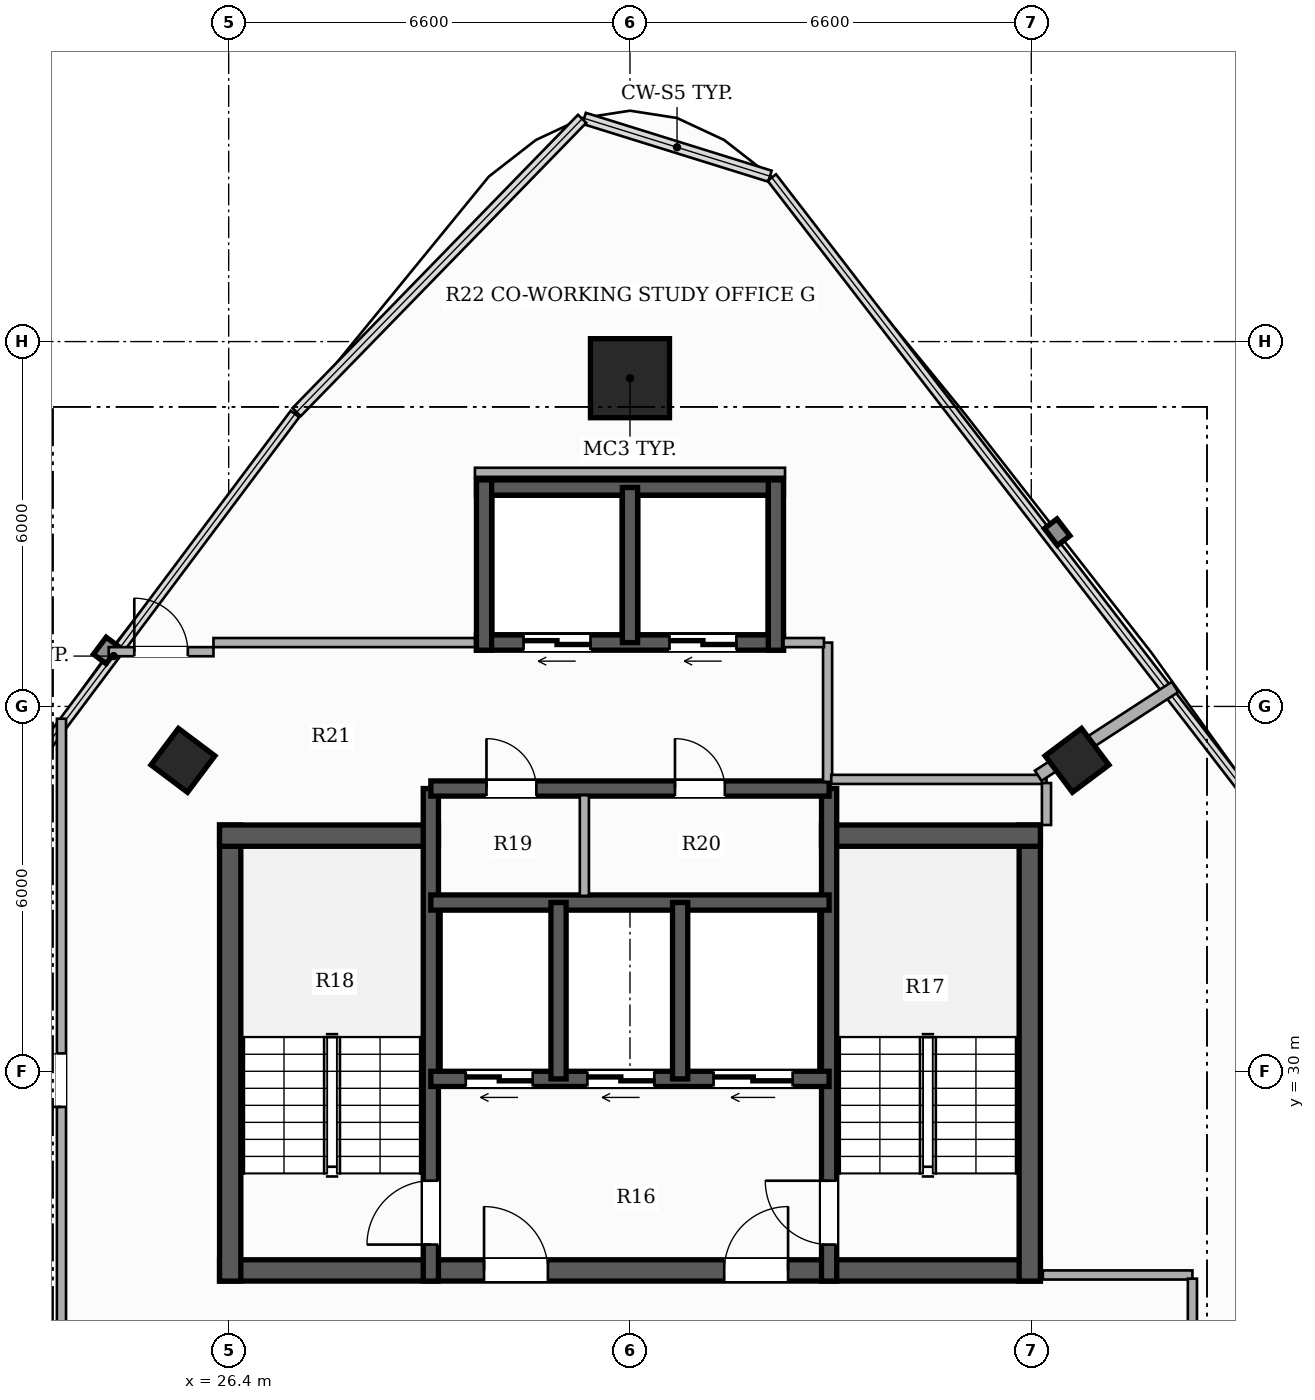
"""IFC4 building model, lengths in metres.
Left out: names, types, materials, properties, quantities, classifications, styles, units other than length and angle.
Written with IfcOpenShell. Run it as: python <this file> out.ifc"""

import sys

from ifc_helpers import new_model, si_unit, direction, frame, frame_2d, origin, origin_2d, place, context, subcontext, project, spatial, rectangle, hollow_rectangle, extrude, element, fill, save


model = new_model("IFC4")
c1 = context("Model", 3, precision=1e-05, world=origin(), true_north=direction((0.0, 1.0)))
c2 = subcontext(c1, "Body", "Model", "MODEL_VIEW")
j1 = project(units=[si_unit("LENGTHUNIT", "METRE"), si_unit("PLANEANGLEUNIT", "RADIAN")], contexts=[c1])
p1 = place(None, origin())
s1 = spatial("IfcSite", under=j1, at=p1, CompositionType="ELEMENT")
p2 = place(p1, origin())
s2 = spatial("IfcBuilding", under=s1, at=p2, CompositionType="ELEMENT")
p3 = place(p2, frame((0.0, 0.0, 232.7)))
s3 = spatial("IfcBuildingStorey", under=s2, at=p3, CompositionType="ELEMENT", Elevation=232.7)
p4 = place(p3, frame((26.25, 26.725, 0.0), z_axis=(0.0, 0.0, 1.0), x_axis=(1.0, 0.0, 0.0)))
e1 = element("IfcWall", 1, at=p4, inside=s3, PredefinedType="SHEAR", context=c2, shape_type="SweptSolid", body=[
    extrude(rectangle(XDim=13.5, YDim=0.35, at=frame_2d((6.75, 0.0))), origin(), (0.0, 0.0, 1.0), 3.3),
])
p5 = place(p4, frame((4.35, 0.0, 0.0)))
e2 = element("IfcOpeningElement", 2, at=p5, cuts=e1, PredefinedType="OPENING", context=c2, shape_type="SweptSolid", body=[
    extrude(rectangle(XDim=1.05, YDim=2.15, at=frame_2d((0.525, 1.075))), frame((0.0, 0.185, 0.0), z_axis=(0.0, -1.0, 0.0), x_axis=(1.0, 0.0, 0.0)), (0.0, 0.0, 1.0), 0.37),
])
p6 = place(p4, frame((8.3, 0.0, 0.0)))
e3 = element("IfcOpeningElement", 3, at=p6, cuts=e1, PredefinedType="OPENING", context=c2, shape_type="SweptSolid", body=[
    extrude(rectangle(XDim=1.05, YDim=2.15, at=frame_2d((0.525, 1.075))), frame((0.0, 0.185, 0.0), z_axis=(0.0, -1.0, 0.0), x_axis=(1.0, 0.0, 0.0)), (0.0, 0.0, 1.0), 0.37),
])
p7 = place(p3, frame((26.425, 26.55, 0.0), z_axis=(0.0, 0.0, 1.0), x_axis=(0.0, 1.0, 0.0)))
e4 = element("IfcWall", 4, at=p7, inside=s3, PredefinedType="SHEAR", context=c2, shape_type="SweptSolid", body=[
    extrude(rectangle(XDim=7.5, YDim=0.35, at=frame_2d((3.75, 0.0))), origin(), (0.0, 0.0, 1.0), 3.3),
])
p8 = place(p3, frame((26.25, 33.875, 0.0), z_axis=(0.0, 0.0, 1.0), x_axis=(1.0, 0.0, 0.0)))
e5 = element("IfcWall", 5, at=p8, inside=s3, PredefinedType="SHEAR", context=c2, shape_type="SweptSolid", body=[
    extrude(rectangle(XDim=3.6, YDim=0.35, at=frame_2d((1.8, 0.0))), origin(), (0.0, 0.0, 1.0), 3.3),
])
p9 = place(p3, frame((39.575, 26.55, 0.0), z_axis=(0.0, 0.0, 1.0), x_axis=(0.0, 1.0, 0.0)))
e6 = element("IfcWall", 6, at=p9, inside=s3, PredefinedType="SHEAR", context=c2, shape_type="SweptSolid", body=[
    extrude(rectangle(XDim=7.5, YDim=0.35, at=frame_2d((3.75, 0.0))), origin(), (0.0, 0.0, 1.0), 3.3),
])
p10 = place(p3, frame((36.15, 33.875, 0.0), z_axis=(0.0, 0.0, 1.0), x_axis=(1.0, 0.0, 0.0)))
e7 = element("IfcWall", 7, at=p10, inside=s3, PredefinedType="SHEAR", context=c2, shape_type="SweptSolid", body=[
    extrude(rectangle(XDim=3.6, YDim=0.35, at=frame_2d((1.8, 0.0))), origin(), (0.0, 0.0, 1.0), 3.3),
])
p11 = place(p3, frame((29.725, 26.55, 0.0), z_axis=(0.0, 0.0, 1.0), x_axis=(0.0, 1.0, 0.0)))
e8 = element("IfcWall", 8, at=p11, inside=s3, PredefinedType="SHEAR", context=c2, shape_type="SweptSolid", body=[
    extrude(rectangle(XDim=8.1, YDim=0.25, at=frame_2d((4.05, 0.0))), origin(), (0.0, 0.0, 1.0), 3.3),
])
p12 = place(p11, frame((0.6, 0.0, 0.0)))
e9 = element("IfcOpeningElement", 9, at=p12, cuts=e8, PredefinedType="OPENING", context=c2, shape_type="SweptSolid", body=[
    extrude(rectangle(XDim=1.05, YDim=2.15, at=frame_2d((0.525, 1.075))), frame((0.0, 0.135, 0.0), z_axis=(0.0, -1.0, 0.0), x_axis=(1.0, 0.0, 0.0)), (0.0, 0.0, 1.0), 0.27),
])
p13 = place(p3, frame((36.275, 26.55, 0.0), z_axis=(0.0, 0.0, 1.0), x_axis=(0.0, 1.0, 0.0)))
e10 = element("IfcWall", 10, at=p13, inside=s3, PredefinedType="SHEAR", context=c2, shape_type="SweptSolid", body=[
    extrude(rectangle(XDim=8.1, YDim=0.25, at=frame_2d((4.05, 0.0))), origin(), (0.0, 0.0, 1.0), 3.3),
])
p14 = place(p13, frame((0.6, 0.0, 0.0)))
e11 = element("IfcOpeningElement", 11, at=p14, cuts=e10, PredefinedType="OPENING", context=c2, shape_type="SweptSolid", body=[
    extrude(rectangle(XDim=1.05, YDim=2.15, at=frame_2d((0.525, 1.075))), frame((0.0, 0.135, 0.0), z_axis=(0.0, -1.0, 0.0), x_axis=(1.0, 0.0, 0.0)), (0.0, 0.0, 1.0), 0.27),
])
p15 = place(p3, frame((36.275, 29.875, 0.0), z_axis=(0.0, 0.0, 1.0), x_axis=(-1.0, 0.0, 0.0)))
e12 = element("IfcWall", 12, at=p15, inside=s3, PredefinedType="SHEAR", context=c2, shape_type="SweptSolid", body=[
    extrude(rectangle(XDim=6.55, YDim=0.25, at=frame_2d((3.275, 0.0))), origin(), (0.0, 0.0, 1.0), 3.3),
])
p16 = place(p15, frame((4.875, 0.0, 0.0)))
e13 = element("IfcOpeningElement", 13, at=p16, cuts=e12, PredefinedType="OPENING", context=c2, shape_type="SweptSolid", body=[
    extrude(rectangle(XDim=1.1, YDim=2.2, at=frame_2d((0.55, 1.1))), frame((0.0, 0.135, 0.0), z_axis=(0.0, -1.0, 0.0), x_axis=(1.0, 0.0, 0.0)), (0.0, 0.0, 1.0), 0.27),
])
p17 = place(p15, frame((2.875, 0.0, 0.0)))
e14 = element("IfcOpeningElement", 14, at=p17, cuts=e12, PredefinedType="OPENING", context=c2, shape_type="SweptSolid", body=[
    extrude(rectangle(XDim=1.1, YDim=2.2, at=frame_2d((0.55, 1.1))), frame((0.0, 0.135, 0.0), z_axis=(0.0, -1.0, 0.0), x_axis=(1.0, 0.0, 0.0)), (0.0, 0.0, 1.0), 0.27),
])
p18 = place(p15, frame((0.6, 0.0, 0.0)))
e15 = element("IfcOpeningElement", 15, at=p18, cuts=e12, PredefinedType="OPENING", context=c2, shape_type="SweptSolid", body=[
    extrude(rectangle(XDim=1.3, YDim=2.2, at=frame_2d((0.65, 1.1))), frame((0.0, 0.135, 0.0), z_axis=(0.0, -1.0, 0.0), x_axis=(1.0, 0.0, 0.0)), (0.0, 0.0, 1.0), 0.27),
])
p19 = place(p3, frame((29.725, 32.775, 0.0), z_axis=(0.0, 0.0, 1.0), x_axis=(1.0, 0.0, 0.0)))
e16 = element("IfcWall", 16, at=p19, inside=s3, PredefinedType="SHEAR", context=c2, shape_type="SweptSolid", body=[
    extrude(rectangle(XDim=6.55, YDim=0.25, at=frame_2d((3.275, 0.0))), origin(), (0.0, 0.0, 1.0), 3.3),
])
for number, where, z_axis, x_axis in (
    (17, (31.825, 29.875, 0.0), (0.0, 0.0, 1.0), (0.0, 1.0, 0.0)),
    (18, (33.825, 29.875, 0.0), (0.0, 0.0, 1.0), (0.0, 1.0, 0.0)),
):
    element("IfcWall", number, at=place(p3, frame(where, z_axis=z_axis, x_axis=x_axis)), inside=s3, PredefinedType="SHEAR", context=c2, shape_type="SweptSolid", body=[
        extrude(rectangle(XDim=2.9, YDim=0.25, at=frame_2d((1.45, 0.0))), origin(), (0.0, 0.0, 1.0), 3.3),
    ])
p20 = place(p3, frame((29.725, 34.65, 0.0), z_axis=(0.0, 0.0, 1.0), x_axis=(1.0, 0.0, 0.0)))
e19 = element("IfcWall", 19, at=p20, inside=s3, PredefinedType="SHEAR", context=c2, shape_type="SweptSolid", body=[
    extrude(rectangle(XDim=6.55, YDim=0.25, at=frame_2d((3.275, 0.0))), origin(), (0.0, 0.0, 1.0), 3.3),
])
p21 = place(p20, frame((0.915, 0.0, 0.0)))
e20 = element("IfcOpeningElement", 20, at=p21, cuts=e19, PredefinedType="OPENING", context=c2, shape_type="SweptSolid", body=[
    extrude(rectangle(XDim=0.82, YDim=2.1, at=frame_2d((0.41, 1.05))), frame((0.0, 0.135, 0.0), z_axis=(0.0, -1.0, 0.0), x_axis=(1.0, 0.0, 0.0)), (0.0, 0.0, 1.0), 0.27),
])
p22 = place(p20, frame((4.015, 0.0, 0.0)))
e21 = element("IfcOpeningElement", 21, at=p22, cuts=e19, PredefinedType="OPENING", context=c2, shape_type="SweptSolid", body=[
    extrude(rectangle(XDim=0.82, YDim=2.1, at=frame_2d((0.41, 1.05))), frame((0.0, 0.135, 0.0), z_axis=(0.0, -1.0, 0.0), x_axis=(1.0, 0.0, 0.0)), (0.0, 0.0, 1.0), 0.27),
])
p23 = place(p3, frame((35.525, 37.05, 0.0), z_axis=(0.0, 0.0, 1.0), x_axis=(-1.0, 0.0, 0.0)))
e22 = element("IfcWall", 22, at=p23, inside=s3, PredefinedType="SHEAR", context=c2, shape_type="SweptSolid", body=[
    extrude(rectangle(XDim=5.05, YDim=0.25, at=frame_2d((2.525, 0.0))), origin(), (0.0, 0.0, 1.0), 3.3),
])
p24 = place(p23, frame((3.175, 0.0, 0.0)))
e23 = element("IfcOpeningElement", 23, at=p24, cuts=e22, PredefinedType="OPENING", context=c2, shape_type="SweptSolid", body=[
    extrude(rectangle(XDim=1.1, YDim=2.2, at=frame_2d((0.55, 1.1))), frame((0.0, 0.135, 0.0), z_axis=(0.0, -1.0, 0.0), x_axis=(1.0, 0.0, 0.0)), (0.0, 0.0, 1.0), 0.27),
])
p25 = place(p23, frame((0.775, 0.0, 0.0)))
e24 = element("IfcOpeningElement", 24, at=p25, cuts=e22, PredefinedType="OPENING", context=c2, shape_type="SweptSolid", body=[
    extrude(rectangle(XDim=1.1, YDim=2.2, at=frame_2d((0.55, 1.1))), frame((0.0, 0.135, 0.0), z_axis=(0.0, -1.0, 0.0), x_axis=(1.0, 0.0, 0.0)), (0.0, 0.0, 1.0), 0.27),
])
p26 = place(p3, frame((30.475, 39.6, 0.0), z_axis=(0.0, 0.0, 1.0), x_axis=(1.0, 0.0, 0.0)))
e25 = element("IfcWall", 25, at=p26, inside=s3, PredefinedType="SHEAR", context=c2, shape_type="SweptSolid", body=[
    extrude(rectangle(XDim=5.05, YDim=0.25, at=frame_2d((2.525, 0.0))), origin(), (0.0, 0.0, 1.0), 3.3),
])
for number, where, z_axis, x_axis in (
    (26, (30.6, 36.925, 0.0), (0.0, 0.0, 1.0), (0.0, 1.0, 0.0)),
    (27, (35.4, 36.925, 0.0), (0.0, 0.0, 1.0), (0.0, 1.0, 0.0)),
):
    element("IfcWall", number, at=place(p3, frame(where, z_axis=z_axis, x_axis=x_axis)), inside=s3, PredefinedType="SHEAR", context=c2, shape_type="SweptSolid", body=[
        extrude(rectangle(XDim=2.8, YDim=0.25, at=frame_2d((1.4, 0.0))), origin(), (0.0, 0.0, 1.0), 3.3),
    ])
p27 = place(p3, frame((33.0, 37.05, 0.0), z_axis=(0.0, 0.0, 1.0), x_axis=(0.0, 1.0, 0.0)))
e28 = element("IfcWall", 28, at=p27, inside=s3, PredefinedType="SHEAR", context=c2, shape_type="SweptSolid", body=[
    extrude(rectangle(XDim=2.55, YDim=0.25, at=frame_2d((1.275, 0.0))), origin(), (0.0, 0.0, 1.0), 3.3),
])
p28 = place(p3, frame((33.0, 41.398, 0.0), z_axis=(0.0, 0.0, 1.0), x_axis=(1.0, 0.0, 0.0)))
e29 = element("IfcColumn", 29, at=p28, inside=s3, PredefinedType="COLUMN", context=c2, shape_type="SweptSolid", body=[
    extrude(hollow_rectangle(XDim=1.3, YDim=1.3, WallThickness=0.04, at=origin_2d()), origin(), (0.0, 0.0, 1.0), 3.3),
])
for number, where, z_axis, x_axis in (
    (30, (25.648, 35.113, 0.0), (0.0, 0.0, 1.0), (0.6, 0.8, 0.0)),
    (31, (40.352, 35.113, 0.0), (0.0, 0.0, 1.0), (-0.6, 0.8, 0.0)),
):
    element("IfcColumn", number, at=place(p3, frame(where, z_axis=z_axis, x_axis=x_axis)), inside=s3, PredefinedType="COLUMN", context=c2, shape_type="SweptSolid", body=[
        extrude(hollow_rectangle(XDim=0.75, YDim=0.75, WallThickness=0.025, at=origin_2d()), origin(), (0.0, 0.0, 1.0), 3.3),
    ])
p29 = place(p3, frame((36.25, 34.76, 0.0), z_axis=(0.0, 0.0, 1.0), x_axis=(0.0, 1.0, 0.0)))
e32 = element("IfcWall", 32, at=p29, inside=s3, PredefinedType="PARTITIONING", context=c2, shape_type="SweptSolid", body=[
    extrude(rectangle(XDim=2.29, YDim=0.15, at=frame_2d((1.145, 0.0))), origin(), (0.0, 0.0, 1.0), 2.385),
])
p30 = place(p3, frame((35.525, 37.05, 0.0), z_axis=(0.0, 0.0, 1.0), x_axis=(1.0, 0.0, 0.0)))
e33 = element("IfcWall", 33, at=p30, inside=s3, PredefinedType="PARTITIONING", context=c2, shape_type="SweptSolid", body=[
    extrude(rectangle(XDim=0.665, YDim=0.15, at=frame_2d((0.333, 0.0))), origin(), (0.0, 0.0, 1.0), 2.385),
])
p31 = place(p3, frame((32.25, 32.885, 0.0), z_axis=(0.0, 0.0, 1.0), x_axis=(0.0, 1.0, 0.0)))
e34 = element("IfcWall", 34, at=p31, inside=s3, PredefinedType="PARTITIONING", context=c2, shape_type="SweptSolid", body=[
    extrude(rectangle(XDim=1.655, YDim=0.15, at=frame_2d((0.828, 0.0))), origin(), (0.0, 0.0, 1.0), 3.02),
])
p32 = place(p3, frame((23.65, 23.91, 0.0), z_axis=(0.0, 0.0, 1.0), x_axis=(0.0, 1.0, 0.0)))
e35 = element("IfcWall", 35, at=p32, inside=s3, PredefinedType="PARTITIONING", context=c2, shape_type="SweptSolid", body=[
    extrude(rectangle(XDim=11.888, YDim=0.15, at=frame_2d((5.944, 0.0))), origin(), (0.0, 0.0, 1.0), 2.452),
])
p33 = place(p32, frame((5.504, 0.0, 0.0)))
e36 = element("IfcOpeningElement", 36, at=p33, cuts=e35, PredefinedType="OPENING", context=c2, shape_type="SweptSolid", body=[
    extrude(rectangle(XDim=0.88, YDim=2.1, at=frame_2d((0.44, 1.05))), frame((0.0, 0.085, 0.0), z_axis=(0.0, -1.0, 0.0), x_axis=(1.0, 0.0, 0.0)), (0.0, 0.0, 1.0), 0.17),
])
p34 = place(p3, frame((24.427, 36.9, 0.0), z_axis=(0.0, 0.0, 1.0), x_axis=(1.0, 0.0, 0.0)))
e37 = element("IfcWall", 37, at=p34, inside=s3, PredefinedType="PARTITIONING", context=c2, shape_type="SweptSolid", body=[
    extrude(rectangle(XDim=1.723, YDim=0.15, at=frame_2d((0.861, 0.0))), origin(), (0.0, 0.0, 1.0), 2.579),
])
p35 = place(p34, frame((0.421, 0.0, 0.0)))
e38 = element("IfcOpeningElement", 38, at=p35, cuts=e37, PredefinedType="OPENING", context=c2, shape_type="SweptSolid", body=[
    extrude(rectangle(XDim=0.88, YDim=2.1, at=frame_2d((0.44, 1.05))), frame((0.0, 0.085, 0.0), z_axis=(0.0, -1.0, 0.0), x_axis=(1.0, 0.0, 0.0)), (0.0, 0.0, 1.0), 0.17),
])
p36 = place(p3, frame((39.79, 26.65, 0.0), z_axis=(0.0, 0.0, 1.0), x_axis=(1.0, 0.0, 0.0)))
e39 = element("IfcWall", 39, at=p36, inside=s3, PredefinedType="PARTITIONING", context=c2, shape_type="SweptSolid", body=[
    extrude(rectangle(XDim=2.46, YDim=0.15, at=frame_2d((1.23, 0.0))), origin(), (0.0, 0.0, 1.0), 2.525),
])
p37 = place(p3, frame((42.25, 26.59, 0.0), z_axis=(0.0, 0.0, 1.0), x_axis=(0.0, -1.0, 0.0)))
e40 = element("IfcWall", 40, at=p37, inside=s3, PredefinedType="PARTITIONING", context=c2, shape_type="SweptSolid", body=[
    extrude(rectangle(XDim=2.74, YDim=0.15, at=frame_2d((1.37, 0.0))), origin(), (0.0, 0.0, 1.0), 2.733),
])
p38 = place(p37, frame((0.91, 0.0, 0.0)))
e41 = element("IfcOpeningElement", 41, at=p38, cuts=e40, PredefinedType="OPENING", context=c2, shape_type="SweptSolid", body=[
    extrude(rectangle(XDim=0.92, YDim=2.15, at=frame_2d((0.46, 1.075))), frame((0.0, 0.085, 0.0), z_axis=(0.0, -1.0, 0.0), x_axis=(1.0, 0.0, 0.0)), (0.0, 0.0, 1.0), 0.17),
])
p39 = place(p3, frame((26.15, 37.05, 0.0), z_axis=(0.0, 0.0, 1.0), x_axis=(1.0, 0.0, 0.0)))
e42 = element("IfcWall", 42, at=p39, inside=s3, PredefinedType="PARTITIONING", context=c2, shape_type="SweptSolid", body=[
    extrude(rectangle(XDim=4.3, YDim=0.15, at=frame_2d((2.15, 0.0))), origin(), (0.0, 0.0, 1.0), 2.385),
])
p40 = place(p3, frame((30.45, 39.85, 0.0), z_axis=(0.0, 0.0, 1.0), x_axis=(1.0, 0.0, 0.0)))
e43 = element("IfcWall", 43, at=p40, inside=s3, PredefinedType="PARTITIONING", context=c2, shape_type="SweptSolid", body=[
    extrude(rectangle(XDim=5.1, YDim=0.15, at=frame_2d((2.55, 0.0))), origin(), (0.0, 0.0, 1.0), 2.452),
])
p41 = place(p3, frame((36.31, 34.8, 0.0), z_axis=(0.0, 0.0, 1.0), x_axis=(1.0, 0.0, 0.0)))
e44 = element("IfcWall", 44, at=p41, inside=s3, PredefinedType="PARTITIONING", context=c2, shape_type="SweptSolid", body=[
    extrude(rectangle(XDim=3.54, YDim=0.15, at=frame_2d((1.77, 0.0))), origin(), (0.0, 0.0, 1.0), 2.385),
])
p42 = place(p3, frame((39.85, 34.74, 0.0), z_axis=(0.0, 0.0, 1.0), x_axis=(0.0, -1.0, 0.0)))
e45 = element("IfcWall", 45, at=p42, inside=s3, PredefinedType="PARTITIONING", context=c2, shape_type="SweptSolid", body=[
    extrude(rectangle(XDim=0.69, YDim=0.15, at=frame_2d((0.345, 0.0))), origin(), (0.0, 0.0, 1.0), 2.733),
])
p43 = place(p3, frame((39.714, 34.86, 0.0), z_axis=(0.0, 0.0, 1.0), x_axis=(0.838740992226, 0.54453057578, 0.0)))
e46 = element("IfcWall", 46, at=p43, inside=s3, PredefinedType="PARTITIONING", context=c2, shape_type="SweptSolid", body=[
    extrude(rectangle(XDim=2.681, YDim=0.2, at=frame_2d((1.341, 0.0))), origin(), (0.0, 0.0, 1.0), 2.452),
])
p44 = place(p12, origin())
e47 = element("IfcDoor", 47, at=p44, inside=s3, OperationType="SINGLE_SWING_LEFT", PredefinedType="DOOR", context=c2, shape_type="SweptSolid", body=[
    extrude(rectangle(XDim=1.05, YDim=2.15, at=frame_2d((0.525, 1.075))), frame((0.0, 0.025, 0.0), z_axis=(0.0, -1.0, 0.0), x_axis=(1.0, 0.0, 0.0)), (0.0, 0.0, 1.0), 0.05),
])
fill(e9, e47)
p45 = place(p14, origin())
e48 = element("IfcDoor", 48, at=p45, inside=s3, OperationType="SINGLE_SWING_RIGHT", PredefinedType="DOOR", context=c2, shape_type="SweptSolid", body=[
    extrude(rectangle(XDim=1.05, YDim=2.15, at=frame_2d((0.525, 1.075))), frame((0.0, 0.025, 0.0), z_axis=(0.0, -1.0, 0.0), x_axis=(1.0, 0.0, 0.0)), (0.0, 0.0, 1.0), 0.05),
])
fill(e11, e48)
p46 = place(p5, origin())
e49 = element("IfcDoor", 49, at=p46, inside=s3, OperationType="SINGLE_SWING_LEFT", PredefinedType="DOOR", context=c2, shape_type="SweptSolid", body=[
    extrude(rectangle(XDim=1.05, YDim=2.15, at=frame_2d((0.525, 1.075))), frame((0.0, 0.025, 0.0), z_axis=(0.0, -1.0, 0.0), x_axis=(1.0, 0.0, 0.0)), (0.0, 0.0, 1.0), 0.05),
])
fill(e2, e49)
p47 = place(p6, origin())
e50 = element("IfcDoor", 50, at=p47, inside=s3, OperationType="SINGLE_SWING_RIGHT", PredefinedType="DOOR", context=c2, shape_type="SweptSolid", body=[
    extrude(rectangle(XDim=1.05, YDim=2.15, at=frame_2d((0.525, 1.075))), frame((0.0, 0.025, 0.0), z_axis=(0.0, -1.0, 0.0), x_axis=(1.0, 0.0, 0.0)), (0.0, 0.0, 1.0), 0.05),
])
fill(e3, e50)
p48 = place(p16, origin())
e51 = element("IfcDoor", 51, at=p48, inside=s3, OperationType="DOUBLE_DOOR_SLIDING", PredefinedType="DOOR", context=c2, shape_type="SweptSolid", body=[
    extrude(rectangle(XDim=1.1, YDim=2.2, at=frame_2d((0.55, 1.1))), frame((0.0, 0.025, 0.0), z_axis=(0.0, -1.0, 0.0), x_axis=(1.0, 0.0, 0.0)), (0.0, 0.0, 1.0), 0.05),
])
fill(e13, e51)
p49 = place(p17, origin())
e52 = element("IfcDoor", 52, at=p49, inside=s3, OperationType="DOUBLE_DOOR_SLIDING", PredefinedType="DOOR", context=c2, shape_type="SweptSolid", body=[
    extrude(rectangle(XDim=1.1, YDim=2.2, at=frame_2d((0.55, 1.1))), frame((0.0, 0.025, 0.0), z_axis=(0.0, -1.0, 0.0), x_axis=(1.0, 0.0, 0.0)), (0.0, 0.0, 1.0), 0.05),
])
fill(e14, e52)
p50 = place(p18, origin())
e53 = element("IfcDoor", 53, at=p50, inside=s3, OperationType="DOUBLE_DOOR_SLIDING", PredefinedType="DOOR", context=c2, shape_type="SweptSolid", body=[
    extrude(rectangle(XDim=1.3, YDim=2.2, at=frame_2d((0.65, 1.1))), frame((0.0, 0.025, 0.0), z_axis=(0.0, -1.0, 0.0), x_axis=(1.0, 0.0, 0.0)), (0.0, 0.0, 1.0), 0.05),
])
fill(e15, e53)
p51 = place(p24, origin())
e54 = element("IfcDoor", 54, at=p51, inside=s3, OperationType="DOUBLE_DOOR_SLIDING", PredefinedType="DOOR", context=c2, shape_type="SweptSolid", body=[
    extrude(rectangle(XDim=1.1, YDim=2.2, at=frame_2d((0.55, 1.1))), frame((0.0, 0.025, 0.0), z_axis=(0.0, -1.0, 0.0), x_axis=(1.0, 0.0, 0.0)), (0.0, 0.0, 1.0), 0.05),
])
fill(e23, e54)
p52 = place(p25, origin())
e55 = element("IfcDoor", 55, at=p52, inside=s3, OperationType="DOUBLE_DOOR_SLIDING", PredefinedType="DOOR", context=c2, shape_type="SweptSolid", body=[
    extrude(rectangle(XDim=1.1, YDim=2.2, at=frame_2d((0.55, 1.1))), frame((0.0, 0.025, 0.0), z_axis=(0.0, -1.0, 0.0), x_axis=(1.0, 0.0, 0.0)), (0.0, 0.0, 1.0), 0.05),
])
fill(e24, e55)
p53 = place(p21, origin())
e56 = element("IfcDoor", 56, at=p53, inside=s3, OperationType="SINGLE_SWING_LEFT", PredefinedType="DOOR", context=c2, shape_type="SweptSolid", body=[
    extrude(rectangle(XDim=0.82, YDim=2.1, at=frame_2d((0.41, 1.05))), frame((0.0, 0.025, 0.0), z_axis=(0.0, -1.0, 0.0), x_axis=(1.0, 0.0, 0.0)), (0.0, 0.0, 1.0), 0.05),
])
fill(e20, e56)
p54 = place(p22, origin())
e57 = element("IfcDoor", 57, at=p54, inside=s3, OperationType="SINGLE_SWING_LEFT", PredefinedType="DOOR", context=c2, shape_type="SweptSolid", body=[
    extrude(rectangle(XDim=0.82, YDim=2.1, at=frame_2d((0.41, 1.05))), frame((0.0, 0.025, 0.0), z_axis=(0.0, -1.0, 0.0), x_axis=(1.0, 0.0, 0.0)), (0.0, 0.0, 1.0), 0.05),
])
fill(e21, e57)
p55 = place(p33, origin())
e58 = element("IfcDoor", 58, at=p55, inside=s3, OperationType="SINGLE_SWING_LEFT", PredefinedType="DOOR", context=c2, shape_type="SweptSolid", body=[
    extrude(rectangle(XDim=0.88, YDim=2.1, at=frame_2d((0.44, 1.05))), frame((0.0, 0.025, 0.0), z_axis=(0.0, -1.0, 0.0), x_axis=(1.0, 0.0, 0.0)), (0.0, 0.0, 1.0), 0.05),
])
fill(e36, e58)
p56 = place(p35, origin())
e59 = element("IfcDoor", 59, at=p56, inside=s3, OperationType="SINGLE_SWING_LEFT", PredefinedType="DOOR", context=c2, shape_type="SweptSolid", body=[
    extrude(rectangle(XDim=0.88, YDim=2.1, at=frame_2d((0.44, 1.05))), frame((0.0, 0.025, 0.0), z_axis=(0.0, -1.0, 0.0), x_axis=(1.0, 0.0, 0.0)), (0.0, 0.0, 1.0), 0.05),
])
fill(e38, e59)
save(model, sys.argv[1])
